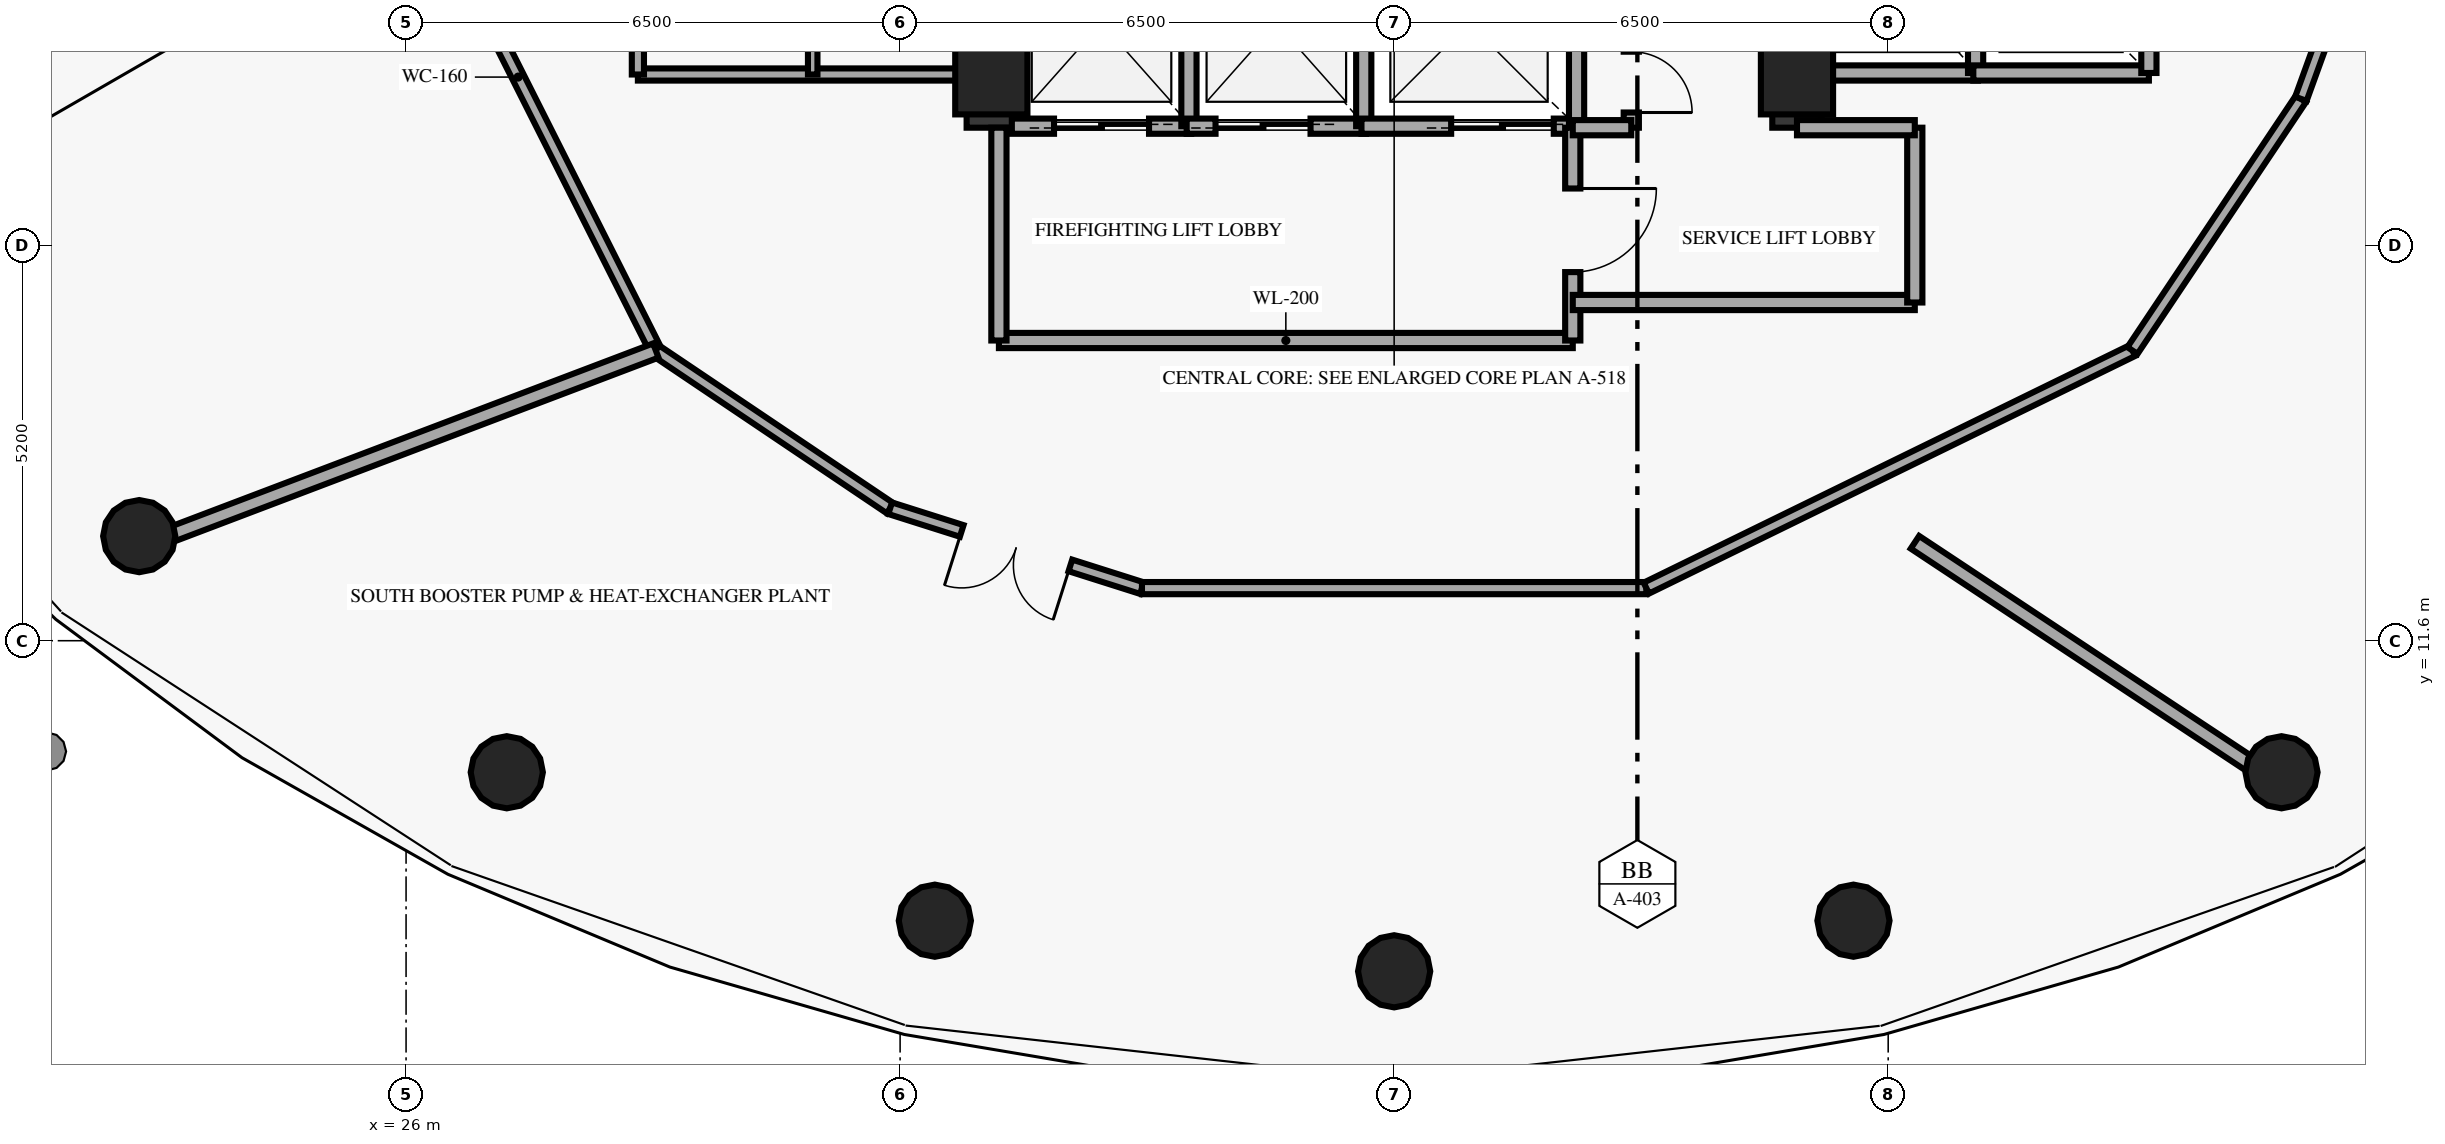
"""IFC4 building model, lengths in metres.
Left out: names, types, materials, properties, quantities, classifications, styles, units other than length and angle.
Written with IfcOpenShell. Run it as: python <this file> out.ifc"""

import sys

from ifc_helpers import new_model, si_unit, direction, frame, frame_2d, origin, origin_2d, place, context, subcontext, project, spatial, rectangle, circle, extrude, element, fill, save


model = new_model("IFC4")
c1 = context("Model", 3, precision=1e-05, world=origin(), true_north=direction((0.0, 1.0)))
c2 = subcontext(c1, "Body", "Model", "MODEL_VIEW")
j1 = project(units=[si_unit("LENGTHUNIT", "METRE"), si_unit("PLANEANGLEUNIT", "RADIAN")], contexts=[c1])
p1 = place(None, origin())
s1 = spatial("IfcSite", under=j1, at=p1, CompositionType="ELEMENT")
p2 = place(p1, origin())
s2 = spatial("IfcBuilding", under=s1, at=p2, CompositionType="ELEMENT")
p3 = place(p2, frame((0.0, 0.0, 195.95)))
s3 = spatial("IfcBuildingStorey", under=s2, at=p3, CompositionType="ELEMENT", Elevation=195.95)
for number, where, z_axis, x_axis in (
    (1, (33.7, 19.0, 0.0), (0.0, 0.0, 1.0), (1.0, 0.0, 0.0)),
    (2, (44.3, 19.0, 0.0), (0.0, 0.0, 1.0), (1.0, 0.0, 0.0)),
):
    element("IfcColumn", number, at=place(p3, frame(where, z_axis=z_axis, x_axis=x_axis)), inside=s3, PredefinedType="PILASTER", context=c2, shape_type="SweptSolid", body=[
        extrude(rectangle(XDim=0.95, YDim=0.95, at=origin_2d()), origin(), (0.0, 0.0, 1.0), 6.88),
    ])
for number, where, z_axis, x_axis in (
    (3, (22.489, 12.976, 0.0), (0.0, 0.0, 1.0), (1.0, 0.0, 0.0)),
    (4, (27.325, 9.869, 0.0), (0.0, 0.0, 1.0), (1.0, 0.0, 0.0)),
    (5, (32.957, 7.916, 0.0), (0.0, 0.0, 1.0), (1.0, 0.0, 0.0)),
    (6, (39.0, 7.25, 0.0), (0.0, 0.0, 1.0), (1.0, 0.0, 0.0)),
    (7, (45.043, 7.916, 0.0), (0.0, 0.0, 1.0), (1.0, 0.0, 0.0)),
    (8, (50.675, 9.869, 0.0), (0.0, 0.0, 1.0), (1.0, 0.0, 0.0)),
):
    element("IfcColumn", number, at=place(p3, frame(where, z_axis=z_axis, x_axis=x_axis)), inside=s3, PredefinedType="COLUMN", context=c2, shape_type="SweptSolid", body=[
        extrude(circle(Radius=0.475, at=origin_2d()), origin(), (0.0, 0.0, 1.0), 6.88),
    ])
for number, where, z_axis, x_axis in (
    (9, (33.7, 18.35, 0.0), (0.0, 0.0, 1.0), (0.0, 1.0, 0.0)),
    (10, (44.3, 18.35, 0.0), (0.0, 0.0, 1.0), (0.0, 1.0, 0.0)),
):
    element("IfcWall", number, at=place(p3, frame(where, z_axis=z_axis, x_axis=x_axis)), inside=s3, PredefinedType="SHEAR", context=c2, shape_type="SweptSolid", body=[
        extrude(rectangle(XDim=2.95, YDim=0.65, at=frame_2d((1.475, 0.0))), origin(), (0.0, 0.0, 1.0), 6.88),
    ])
p4 = place(p3, frame((44.57, 19.07, 0.0), z_axis=(0.0, 0.0, 1.0), x_axis=(1.0, 0.0, 0.0)))
e11 = element("IfcWall", 11, at=p4, inside=s3, PredefinedType="SOLIDWALL", context=c2, shape_type="SweptSolid", body=[
    extrude(rectangle(XDim=2.11, YDim=0.2, at=frame_2d((1.055, 0.0))), origin(), (0.0, 0.0, 1.0), 6.88),
])
for number, where, z_axis, x_axis in (
    (12, (46.65, 19.07, 0.0), (0.0, 0.0, 1.0), (0.0, 1.0, 0.0)),
    (13, (46.62, 19.07, 0.0), (0.0, 0.0, 1.0), (1.0, 0.0, 0.0)),
    (14, (48.93, 19.07, 0.0), (0.0, 0.0, 1.0), (0.0, 1.0, 0.0)),
):
    element("IfcWall", number, at=place(p3, frame(where, z_axis=z_axis, x_axis=x_axis)), inside=s3, PredefinedType="SOLIDWALL", context=c2, shape_type="SweptSolid", body=[
        extrude(rectangle(XDim=2.31, YDim=0.2, at=frame_2d((1.155, 0.0))), origin(), (0.0, 0.0, 1.0), 6.88),
    ])
p5 = place(p3, frame((33.97, 18.37, 0.0), z_axis=(0.0, 0.0, 1.0), x_axis=(1.0, 0.0, 0.0)))
e15 = element("IfcWall", 15, at=p5, inside=s3, PredefinedType="SOLIDWALL", context=c2, shape_type="SweptSolid", body=[
    extrude(rectangle(XDim=2.36, YDim=0.2, at=frame_2d((1.18, 0.0))), origin(), (0.0, 0.0, 1.0), 6.88),
])
p6 = place(p5, frame((0.555, 0.0, 0.0)))
e16 = element("IfcOpeningElement", 16, at=p6, cuts=e15, PredefinedType="OPENING", context=c2, shape_type="SweptSolid", body=[
    extrude(rectangle(XDim=1.25, YDim=2.2, at=frame_2d((0.625, 1.1))), frame((0.0, 0.11, 0.0), z_axis=(0.0, -1.0, 0.0), x_axis=(1.0, 0.0, 0.0)), (0.0, 0.0, 1.0), 0.22),
])
p7 = place(p3, frame((36.3, 18.37, 0.0), z_axis=(0.0, 0.0, 1.0), x_axis=(0.0, 1.0, 0.0)))
e17 = element("IfcWall", 17, at=p7, inside=s3, PredefinedType="SOLIDWALL", context=c2, shape_type="SweptSolid", body=[
    extrude(rectangle(XDim=2.71, YDim=0.2, at=frame_2d((1.355, 0.0))), origin(), (0.0, 0.0, 1.0), 6.88),
])
p8 = place(p3, frame((36.27, 18.37, 0.0), z_axis=(0.0, 0.0, 1.0), x_axis=(1.0, 0.0, 0.0)))
e18 = element("IfcWall", 18, at=p8, inside=s3, PredefinedType="SOLIDWALL", context=c2, shape_type="SweptSolid", body=[
    extrude(rectangle(XDim=2.36, YDim=0.2, at=frame_2d((1.18, 0.0))), origin(), (0.0, 0.0, 1.0), 6.88),
])
p9 = place(p8, frame((0.38, 0.0, 0.0)))
e19 = element("IfcOpeningElement", 19, at=p9, cuts=e18, PredefinedType="OPENING", context=c2, shape_type="SweptSolid", body=[
    extrude(rectangle(XDim=1.25, YDim=2.2, at=frame_2d((0.625, 1.1))), frame((0.0, 0.11, 0.0), z_axis=(0.0, -1.0, 0.0), x_axis=(1.0, 0.0, 0.0)), (0.0, 0.0, 1.0), 0.22),
])
p10 = place(p3, frame((38.6, 18.37, 0.0), z_axis=(0.0, 0.0, 1.0), x_axis=(0.0, 1.0, 0.0)))
e20 = element("IfcWall", 20, at=p10, inside=s3, PredefinedType="SOLIDWALL", context=c2, shape_type="SweptSolid", body=[
    extrude(rectangle(XDim=2.71, YDim=0.2, at=frame_2d((1.355, 0.0))), origin(), (0.0, 0.0, 1.0), 6.88),
])
p11 = place(p3, frame((38.57, 18.37, 0.0), z_axis=(0.0, 0.0, 1.0), x_axis=(1.0, 0.0, 0.0)))
e21 = element("IfcWall", 21, at=p11, inside=s3, PredefinedType="SOLIDWALL", context=c2, shape_type="SweptSolid", body=[
    extrude(rectangle(XDim=2.83, YDim=0.2, at=frame_2d((1.415, 0.0))), origin(), (0.0, 0.0, 1.0), 6.88),
])
p12 = place(p11, frame((1.18, 0.0, 0.0)))
e22 = element("IfcOpeningElement", 22, at=p12, cuts=e21, PredefinedType="OPENING", context=c2, shape_type="SweptSolid", body=[
    extrude(rectangle(XDim=1.35, YDim=2.18, at=frame_2d((0.675, 1.09))), frame((0.0, 0.11, 0.0), z_axis=(0.0, -1.0, 0.0), x_axis=(1.0, 0.0, 0.0)), (0.0, 0.0, 1.0), 0.22),
])
p13 = place(p3, frame((41.4, 18.37, 0.0), z_axis=(0.0, 0.0, 1.0), x_axis=(0.0, 1.0, 0.0)))
e23 = element("IfcWall", 23, at=p13, inside=s3, PredefinedType="SOLIDWALL", context=c2, shape_type="SweptSolid", body=[
    extrude(rectangle(XDim=2.71, YDim=0.2, at=frame_2d((1.355, 0.0))), origin(), (0.0, 0.0, 1.0), 6.88),
])
p14 = place(p3, frame((29.05, 19.05, 0.0), z_axis=(0.0, 0.0, 1.0), x_axis=(1.0, 0.0, 0.0)))
e24 = element("IfcWall", 24, at=p14, inside=s3, PredefinedType="PARTITIONING", context=c2, shape_type="SweptSolid", body=[
    extrude(rectangle(XDim=4.65, YDim=0.16, at=frame_2d((2.325, 0.0))), origin(), (0.0, 0.0, 1.0), 6.88),
])
p15 = place(p3, frame((29.05, 19.05, 0.0), z_axis=(0.0, 0.0, 1.0), x_axis=(0.0, 1.0, 0.0)))
e25 = element("IfcWall", 25, at=p15, inside=s3, PredefinedType="PARTITIONING", context=c2, shape_type="SweptSolid", body=[
    extrude(rectangle(XDim=7.07, YDim=0.16, at=frame_2d((3.535, 0.0))), origin(), (0.0, 0.0, 1.0), 6.88),
])
p16 = place(p3, frame((31.35, 19.05, 0.0), z_axis=(0.0, 0.0, 1.0), x_axis=(0.0, 1.0, 0.0)))
e26 = element("IfcWall", 26, at=p16, inside=s3, PredefinedType="PARTITIONING", context=c2, shape_type="SweptSolid", body=[
    extrude(rectangle(XDim=2.8, YDim=0.125, at=frame_2d((1.4, 0.0))), origin(), (0.0, 0.0, 1.0), 6.88),
])
p17 = place(p3, frame((33.8, 15.55, 0.0), z_axis=(0.0, 0.0, 1.0), x_axis=(1.0, 0.0, 0.0)))
e27 = element("IfcWall", 27, at=p17, inside=s3, PredefinedType="SOLIDWALL", context=c2, shape_type="SweptSolid", body=[
    extrude(rectangle(XDim=7.55, YDim=0.2, at=frame_2d((3.775, 0.0))), origin(), (0.0, 0.0, 1.0), 6.88),
])
p18 = place(p3, frame((33.8, 15.55, 0.0), z_axis=(0.0, 0.0, 1.0), x_axis=(0.0, 1.0, 0.0)))
e28 = element("IfcWall", 28, at=p18, inside=s3, PredefinedType="SOLIDWALL", context=c2, shape_type="SweptSolid", body=[
    extrude(rectangle(XDim=2.8, YDim=0.2, at=frame_2d((1.4, 0.0))), origin(), (0.0, 0.0, 1.0), 6.88),
])
p19 = place(p3, frame((41.35, 15.55, 0.0), z_axis=(0.0, 0.0, 1.0), x_axis=(0.0, 1.0, 0.0)))
e29 = element("IfcWall", 29, at=p19, inside=s3, PredefinedType="SOLIDWALL", context=c2, shape_type="SweptSolid", body=[
    extrude(rectangle(XDim=2.8, YDim=0.2, at=frame_2d((1.4, 0.0))), origin(), (0.0, 0.0, 1.0), 6.88),
])
p20 = place(p19, frame((0.9, 0.0, 0.0)))
e30 = element("IfcOpeningElement", 30, at=p20, cuts=e29, PredefinedType="OPENING", context=c2, shape_type="SweptSolid", body=[
    extrude(rectangle(XDim=1.1, YDim=2.15, at=frame_2d((0.55, 1.075))), frame((0.0, 0.11, 0.0), z_axis=(0.0, -1.0, 0.0), x_axis=(1.0, 0.0, 0.0)), (0.0, 0.0, 1.0), 0.22),
])
p21 = place(p3, frame((41.35, 16.05, 0.0), z_axis=(0.0, 0.0, 1.0), x_axis=(1.0, 0.0, 0.0)))
e31 = element("IfcWall", 31, at=p21, inside=s3, PredefinedType="SOLIDWALL", context=c2, shape_type="SweptSolid", body=[
    extrude(rectangle(XDim=4.5, YDim=0.2, at=frame_2d((2.25, 0.0))), origin(), (0.0, 0.0, 1.0), 6.88),
])
p22 = place(p3, frame((45.85, 16.05, 0.0), z_axis=(0.0, 0.0, 1.0), x_axis=(0.0, 1.0, 0.0)))
e32 = element("IfcWall", 32, at=p22, inside=s3, PredefinedType="SOLIDWALL", context=c2, shape_type="SweptSolid", body=[
    extrude(rectangle(XDim=2.3, YDim=0.2, at=frame_2d((1.15, 0.0))), origin(), (0.0, 0.0, 1.0), 6.88),
])
p23 = place(p3, frame((44.3, 18.35, 0.0), z_axis=(0.0, 0.0, 1.0), x_axis=(1.0, 0.0, 0.0)))
e33 = element("IfcWall", 33, at=p23, inside=s3, PredefinedType="SOLIDWALL", context=c2, shape_type="SweptSolid", body=[
    extrude(rectangle(XDim=1.55, YDim=0.2, at=frame_2d((0.775, 0.0))), origin(), (0.0, 0.0, 1.0), 6.88),
])
p24 = place(p3, frame((42.12, 18.35, 0.0), z_axis=(0.0, 0.0, 1.0), x_axis=(0.0, 1.0, 0.0)))
e34 = element("IfcWall", 34, at=p24, inside=s3, PredefinedType="SOLIDWALL", context=c2, shape_type="SweptSolid", body=[
    extrude(rectangle(XDim=2.95, YDim=0.2, at=frame_2d((1.475, 0.0))), origin(), (0.0, 0.0, 1.0), 6.88),
])
p25 = place(p24, frame((0.2, 0.0, 0.0)))
e35 = element("IfcOpeningElement", 35, at=p25, cuts=e34, PredefinedType="OPENING", context=c2, shape_type="SweptSolid", body=[
    extrude(rectangle(XDim=0.8, YDim=2.05, at=frame_2d((0.4, 1.025))), frame((0.0, 0.11, 0.0), z_axis=(0.0, -1.0, 0.0), x_axis=(1.0, 0.0, 0.0)), (0.0, 0.0, 1.0), 0.22),
])
p26 = place(p3, frame((41.35, 18.35, 0.0), z_axis=(0.0, 0.0, 1.0), x_axis=(1.0, 0.0, 0.0)))
e36 = element("IfcWall", 36, at=p26, inside=s3, PredefinedType="SOLIDWALL", context=c2, shape_type="SweptSolid", body=[
    extrude(rectangle(XDim=0.77, YDim=0.2, at=frame_2d((0.385, 0.0))), origin(), (0.0, 0.0, 1.0), 6.88),
])
p27 = place(p3, frame((25.663, 22.614, 0.0), z_axis=(0.0, 0.0, 1.0), x_axis=(0.449672541353, -0.893193487187, 0.0)))
e37 = element("IfcWall", 37, at=p27, inside=s3, PredefinedType="PARTITIONING", context=c2, shape_type="SweptSolid", body=[
    extrude(rectangle(XDim=8.057, YDim=0.16, at=frame_2d((4.028, 0.0))), origin(), (0.0, 0.0, 1.0), 6.88),
])
p28 = place(p3, frame((29.286, 15.418, 0.0), z_axis=(0.0, 0.0, 1.0), x_axis=(0.829606474383, -0.558348544962, 0.0)))
e38 = element("IfcWall", 38, at=p28, inside=s3, PredefinedType="PARTITIONING", context=c2, shape_type="SweptSolid", body=[
    extrude(rectangle(XDim=3.716, YDim=0.16, at=frame_2d((1.858, 0.0))), origin(), (0.0, 0.0, 1.0), 6.88),
])
p29 = place(p3, frame((35.682, 12.292, 0.0), z_axis=(0.0, 0.0, 1.0), x_axis=(-0.953183734956, 0.302391744951, 0.0)))
e39 = element("IfcWall", 39, at=p29, inside=s3, PredefinedType="PARTITIONING", context=c2, shape_type="SweptSolid", body=[
    extrude(rectangle(XDim=3.476, YDim=0.16, at=frame_2d((1.738, 0.0))), origin(), (0.0, 0.0, 1.0), 6.88),
])
p30 = place(p29, frame((0.988, 0.0, 0.0)))
e40 = element("IfcOpeningElement", 40, at=p30, cuts=e39, PredefinedType="OPENING", context=c2, shape_type="SweptSolid", body=[
    extrude(rectangle(XDim=1.5, YDim=2.2, at=frame_2d((0.75, 1.1))), frame((0.0, 0.09, 0.0), z_axis=(0.0, -1.0, 0.0), x_axis=(1.0, 0.0, 0.0)), (0.0, 0.0, 1.0), 0.18),
])
p31 = place(p3, frame((35.682, 12.292, 0.0), z_axis=(0.0, 0.0, 1.0), x_axis=(1.0, 0.0, 0.0)))
e41 = element("IfcWall", 41, at=p31, inside=s3, PredefinedType="PARTITIONING", context=c2, shape_type="SweptSolid", body=[
    extrude(rectangle(XDim=6.636, YDim=0.16, at=frame_2d((3.318, 0.0))), origin(), (0.0, 0.0, 1.0), 6.88),
])
p32 = place(p3, frame((42.318, 12.292, 0.0), z_axis=(0.0, 0.0, 1.0), x_axis=(0.898437278598, 0.439101874768, 0.0)))
e42 = element("IfcWall", 42, at=p32, inside=s3, PredefinedType="PARTITIONING", context=c2, shape_type="SweptSolid", body=[
    extrude(rectangle(XDim=7.119, YDim=0.16, at=frame_2d((3.56, 0.0))), origin(), (0.0, 0.0, 1.0), 6.88),
])
p33 = place(p3, frame((48.714, 15.418, 0.0), z_axis=(0.0, 0.0, 1.0), x_axis=(0.556056751682, 0.831144324958, 0.0)))
e43 = element("IfcWall", 43, at=p33, inside=s3, PredefinedType="PARTITIONING", context=c2, shape_type="SweptSolid", body=[
    extrude(rectangle(XDim=3.985, YDim=0.16, at=frame_2d((1.992, 0.0))), origin(), (0.0, 0.0, 1.0), 6.88),
])
p34 = place(p3, frame((52.337, 22.614, 0.0), z_axis=(0.0, 0.0, 1.0), x_axis=(-0.34058972089, -0.940212019719, 0.0)))
e44 = element("IfcWall", 44, at=p34, inside=s3, PredefinedType="PARTITIONING", context=c2, shape_type="SweptSolid", body=[
    extrude(rectangle(XDim=4.131, YDim=0.16, at=frame_2d((2.065, 0.0))), origin(), (0.0, 0.0, 1.0), 6.88),
])
p35 = place(p34, frame((1.315, 0.0, 0.0)))
e45 = element("IfcOpeningElement", 45, at=p35, cuts=e44, PredefinedType="OPENING", context=c2, shape_type="SweptSolid", body=[
    extrude(rectangle(XDim=1.5, YDim=2.2, at=frame_2d((0.75, 1.1))), frame((0.0, 0.09, 0.0), z_axis=(0.0, -1.0, 0.0), x_axis=(1.0, 0.0, 0.0)), (0.0, 0.0, 1.0), 0.18),
])
p36 = place(p3, frame((29.286, 15.418, 0.0), z_axis=(0.0, 0.0, 1.0), x_axis=(-0.934893013083, -0.354929646674, 0.0)))
e46 = element("IfcWall", 46, at=p36, inside=s3, PredefinedType="SOLIDWALL", context=c2, shape_type="SweptSolid", body=[
    extrude(rectangle(XDim=7.509, YDim=0.2, at=frame_2d((3.754, 0.0))), origin(), (0.0, 0.0, 1.0), 6.88),
])
p37 = place(p3, frame((45.852, 12.895, 0.0), z_axis=(0.0, 0.0, 1.0), x_axis=(0.833712545804, -0.552198687945, 0.0)))
e47 = element("IfcWall", 47, at=p37, inside=s3, PredefinedType="SOLIDWALL", context=c2, shape_type="SweptSolid", body=[
    extrude(rectangle(XDim=5.974, YDim=0.2, at=frame_2d((2.987, 0.0))), origin(), (0.0, 0.0, 1.0), 6.88),
])
p38 = place(p6, origin())
e48 = element("IfcDoor", 48, at=p38, inside=s3, OperationType="DOUBLE_DOOR_SLIDING", PredefinedType="DOOR", context=c2, shape_type="SweptSolid", body=[
    extrude(rectangle(XDim=1.25, YDim=2.2, at=frame_2d((0.625, 1.1))), frame((0.0, 0.025, 0.0), z_axis=(0.0, -1.0, 0.0), x_axis=(1.0, 0.0, 0.0)), (0.0, 0.0, 1.0), 0.05),
])
fill(e16, e48)
p39 = place(p9, origin())
e49 = element("IfcDoor", 49, at=p39, inside=s3, OperationType="DOUBLE_DOOR_SLIDING", PredefinedType="DOOR", context=c2, shape_type="SweptSolid", body=[
    extrude(rectangle(XDim=1.25, YDim=2.2, at=frame_2d((0.625, 1.1))), frame((0.0, 0.025, 0.0), z_axis=(0.0, -1.0, 0.0), x_axis=(1.0, 0.0, 0.0)), (0.0, 0.0, 1.0), 0.05),
])
fill(e19, e49)
p40 = place(p12, origin())
e50 = element("IfcDoor", 50, at=p40, inside=s3, OperationType="DOUBLE_DOOR_SLIDING", PredefinedType="DOOR", context=c2, shape_type="SweptSolid", body=[
    extrude(rectangle(XDim=1.35, YDim=2.18, at=frame_2d((0.675, 1.09))), frame((0.0, 0.025, 0.0), z_axis=(0.0, -1.0, 0.0), x_axis=(1.0, 0.0, 0.0)), (0.0, 0.0, 1.0), 0.05),
])
fill(e22, e50)
p41 = place(p20, origin())
e51 = element("IfcDoor", 51, at=p41, inside=s3, OperationType="SINGLE_SWING_RIGHT", PredefinedType="DOOR", context=c2, shape_type="SweptSolid", body=[
    extrude(rectangle(XDim=1.1, YDim=2.15, at=frame_2d((0.55, 1.075))), frame((0.0, 0.025, 0.0), z_axis=(0.0, -1.0, 0.0), x_axis=(1.0, 0.0, 0.0)), (0.0, 0.0, 1.0), 0.05),
])
fill(e30, e51)
p42 = place(p25, origin())
e52 = element("IfcDoor", 52, at=p42, inside=s3, OperationType="SINGLE_SWING_LEFT", PredefinedType="DOOR", context=c2, shape_type="SweptSolid", body=[
    extrude(rectangle(XDim=0.8, YDim=2.05, at=frame_2d((0.4, 1.025))), frame((0.0, 0.025, 0.0), z_axis=(0.0, -1.0, 0.0), x_axis=(1.0, 0.0, 0.0)), (0.0, 0.0, 1.0), 0.05),
])
fill(e35, e52)
p43 = place(p30, origin())
e53 = element("IfcDoor", 53, at=p43, inside=s3, OperationType="DOUBLE_DOOR_SINGLE_SWING", PredefinedType="DOOR", context=c2, shape_type="SweptSolid", body=[
    extrude(rectangle(XDim=1.5, YDim=2.2, at=frame_2d((0.75, 1.1))), frame((0.0, 0.025, 0.0), z_axis=(0.0, -1.0, 0.0), x_axis=(1.0, 0.0, 0.0)), (0.0, 0.0, 1.0), 0.05),
])
fill(e40, e53)
save(model, sys.argv[1])
